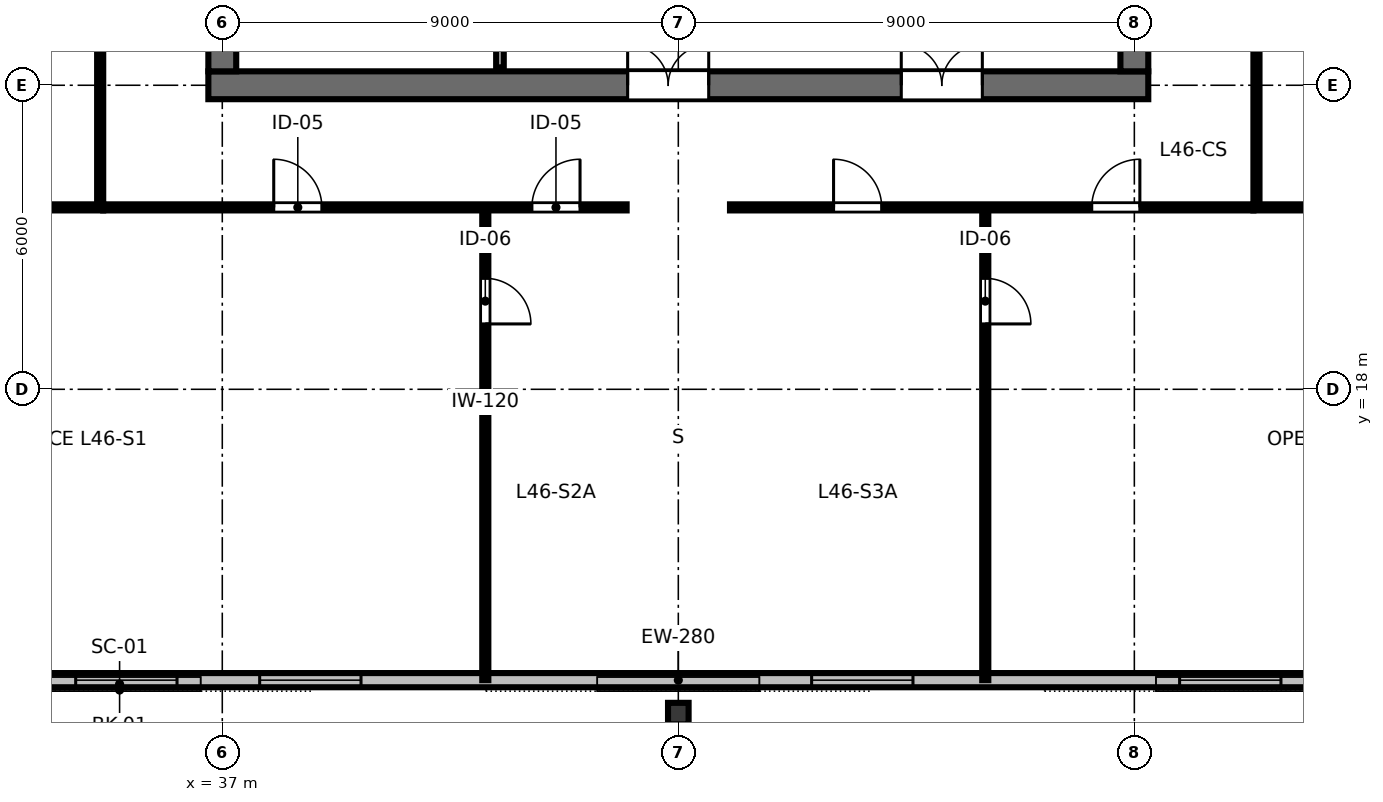
"""IFC4 building model, lengths in metres.
Left out: names, types, materials, properties, quantities, classifications, styles, units other than length and angle.
Written with IfcOpenShell. Run it as: python <this file> out.ifc"""

import sys

from ifc_helpers import new_model, si_unit, direction, frame, frame_2d, origin, origin_2d, place, context, subcontext, project, spatial, rectangle, i_section, extrude, element, fill, save


model = new_model("IFC4")
c1 = context("Model", 3, precision=1e-05, world=origin(), true_north=direction((0.0, 1.0)))
c2 = subcontext(c1, "Body", "Model", "MODEL_VIEW")
j1 = project(units=[si_unit("LENGTHUNIT", "METRE"), si_unit("PLANEANGLEUNIT", "RADIAN")], contexts=[c1])
p1 = place(None, origin())
s1 = spatial("IfcSite", under=j1, at=p1, CompositionType="ELEMENT")
p2 = place(p1, origin())
s2 = spatial("IfcBuilding", under=s1, at=p2, CompositionType="ELEMENT")
p3 = place(p2, frame((0.0, 0.0, 177.0)))
s3 = spatial("IfcBuildingStorey", under=s2, at=p3, CompositionType="ELEMENT", Elevation=177.0)
p4 = place(p3, frame((36.725, 24.0, 0.0), z_axis=(0.0, 0.0, 1.0), x_axis=(1.0, 0.0, 0.0)))
e1 = element("IfcWall", 1, at=p4, inside=s3, PredefinedType="SHEAR", context=c2, shape_type="SweptSolid", body=[
    extrude(rectangle(XDim=18.55, YDim=0.55, at=frame_2d((9.275, 0.0))), origin(), (0.0, 0.0, 1.0), 3.36),
])
p5 = place(p4, frame((8.275, 0.0, 0.0)))
e2 = element("IfcOpeningElement", 2, at=p5, cuts=e1, PredefinedType="OPENING", context=c2, shape_type="SweptSolid", body=[
    extrude(rectangle(XDim=1.6, YDim=2.15, at=frame_2d((0.8, 1.075))), frame((0.0, 0.285, 0.0), z_axis=(0.0, -1.0, 0.0), x_axis=(1.0, 0.0, 0.0)), (0.0, 0.0, 1.0), 0.57),
])
p6 = place(p4, frame((13.675, 0.0, 0.0)))
e3 = element("IfcOpeningElement", 3, at=p6, cuts=e1, PredefinedType="OPENING", context=c2, shape_type="SweptSolid", body=[
    extrude(rectangle(XDim=1.6, YDim=2.15, at=frame_2d((0.8, 1.075))), frame((0.0, 0.285, 0.0), z_axis=(0.0, -1.0, 0.0), x_axis=(1.0, 0.0, 0.0)), (0.0, 0.0, 1.0), 0.57),
])
p7 = place(p3, frame((37.0, 24.275, 0.0), z_axis=(0.0, 0.0, 1.0), x_axis=(0.0, 1.0, 0.0)))
e4 = element("IfcWall", 4, at=p7, inside=s3, PredefinedType="SHEAR", context=c2, shape_type="SweptSolid", body=[
    extrude(rectangle(XDim=15.45, YDim=0.55, at=frame_2d((7.725, 0.0))), origin(), (0.0, 0.0, 1.0), 3.36),
])
p8 = place(p7, frame((5.25, 0.0, 0.0)))
e5 = element("IfcOpeningElement", 5, at=p8, cuts=e4, PredefinedType="OPENING", context=c2, shape_type="SweptSolid", body=[
    extrude(rectangle(XDim=1.15, YDim=2.15, at=frame_2d((0.575, 1.075))), frame((0.0, 0.285, 0.0), z_axis=(0.0, -1.0, 0.0), x_axis=(1.0, 0.0, 0.0)), (0.0, 0.0, 1.0), 0.57),
])
p9 = place(p3, frame((55.0, 24.275, 0.0), z_axis=(0.0, 0.0, 1.0), x_axis=(0.0, 1.0, 0.0)))
e6 = element("IfcWall", 6, at=p9, inside=s3, PredefinedType="SHEAR", context=c2, shape_type="SweptSolid", body=[
    extrude(rectangle(XDim=15.45, YDim=0.55, at=frame_2d((7.725, 0.0))), origin(), (0.0, 0.0, 1.0), 3.36),
])
p10 = place(p9, frame((5.25, 0.0, 0.0)))
e7 = element("IfcOpeningElement", 7, at=p10, cuts=e6, PredefinedType="OPENING", context=c2, shape_type="SweptSolid", body=[
    extrude(rectangle(XDim=1.15, YDim=2.15, at=frame_2d((0.575, 1.075))), frame((0.0, 0.285, 0.0), z_axis=(0.0, -1.0, 0.0), x_axis=(1.0, 0.0, 0.0)), (0.0, 0.0, 1.0), 0.57),
])
p11 = place(p3, frame((46.0, 11.6, 0.0), z_axis=(0.0, 0.0, 1.0), x_axis=(1.0, 0.0, 0.0)))
e8 = element("IfcColumn", 8, at=p11, inside=s3, PredefinedType="COLUMN", context=c2, shape_type="SweptSolid", body=[
    extrude(i_section(OverallWidth=0.406, OverallDepth=0.425, WebThickness=0.033, FlangeThickness=0.052, FilletRadius=0.025, at=origin_2d()), origin(), (0.0, 0.0, 1.0), 3.358),
])
p12 = place(p3, frame((28.56, 12.26, 0.0), z_axis=(0.0, 0.0, 1.0), x_axis=(1.0, 0.0, 0.0)))
e9 = element("IfcWall", 9, at=p12, inside=s3, PredefinedType="STANDARD", context=c2, shape_type="SweptSolid", body=[
    extrude(rectangle(XDim=34.88, YDim=0.28, at=frame_2d((17.44, 0.0))), origin(), (0.0, 0.0, 1.0), 3.36),
])
p13 = place(p12, frame((1.916, 0.0, 0.8)))
e10 = element("IfcOpeningElement", 10, at=p13, cuts=e9, PredefinedType="OPENING", context=c2, shape_type="SweptSolid", body=[
    extrude(rectangle(XDim=2.0, YDim=1.95, at=frame_2d((1.0, 0.975))), frame((0.0, 0.15, 0.0), z_axis=(0.0, -1.0, 0.0), x_axis=(1.0, 0.0, 0.0)), (0.0, 0.0, 1.0), 0.3),
])
p14 = place(p12, frame((5.547, 0.0, 0.8)))
e11 = element("IfcOpeningElement", 11, at=p14, cuts=e9, PredefinedType="OPENING", context=c2, shape_type="SweptSolid", body=[
    extrude(rectangle(XDim=2.0, YDim=1.95, at=frame_2d((1.0, 0.975))), frame((0.0, 0.15, 0.0), z_axis=(0.0, -1.0, 0.0), x_axis=(1.0, 0.0, 0.0)), (0.0, 0.0, 1.0), 0.3),
])
p15 = place(p12, frame((9.178, 0.0, 0.8)))
e12 = element("IfcOpeningElement", 12, at=p15, cuts=e9, PredefinedType="OPENING", context=c2, shape_type="SweptSolid", body=[
    extrude(rectangle(XDim=2.0, YDim=1.95, at=frame_2d((1.0, 0.975))), frame((0.0, 0.15, 0.0), z_axis=(0.0, -1.0, 0.0), x_axis=(1.0, 0.0, 0.0)), (0.0, 0.0, 1.0), 0.3),
])
p16 = place(p12, frame((20.071, 0.0, 0.8)))
e13 = element("IfcOpeningElement", 13, at=p16, cuts=e9, PredefinedType="OPENING", context=c2, shape_type="SweptSolid", body=[
    extrude(rectangle(XDim=2.0, YDim=1.95, at=frame_2d((1.0, 0.975))), frame((0.0, 0.15, 0.0), z_axis=(0.0, -1.0, 0.0), x_axis=(1.0, 0.0, 0.0)), (0.0, 0.0, 1.0), 0.3),
])
p17 = place(p12, frame((27.333, 0.0, 0.8)))
e14 = element("IfcOpeningElement", 14, at=p17, cuts=e9, PredefinedType="OPENING", context=c2, shape_type="SweptSolid", body=[
    extrude(rectangle(XDim=2.0, YDim=1.95, at=frame_2d((1.0, 0.975))), frame((0.0, 0.15, 0.0), z_axis=(0.0, -1.0, 0.0), x_axis=(1.0, 0.0, 0.0)), (0.0, 0.0, 1.0), 0.3),
])
p18 = place(p12, frame((30.964, 0.0, 0.8)))
e15 = element("IfcOpeningElement", 15, at=p18, cuts=e9, PredefinedType="OPENING", context=c2, shape_type="SweptSolid", body=[
    extrude(rectangle(XDim=2.0, YDim=1.95, at=frame_2d((1.0, 0.975))), frame((0.0, 0.15, 0.0), z_axis=(0.0, -1.0, 0.0), x_axis=(1.0, 0.0, 0.0)), (0.0, 0.0, 1.0), 0.3),
])
p19 = place(p3, frame((42.48, 24.35, 0.0), z_axis=(0.0, 0.0, 1.0), x_axis=(0.0, 1.0, 0.0)))
e16 = element("IfcWall", 16, at=p19, inside=s3, PredefinedType="PARTITIONING", context=c2, shape_type="SweptSolid", body=[
    extrude(rectangle(XDim=3.9, YDim=0.15, at=frame_2d((1.95, 0.0))), origin(), (0.0, 0.0, 1.0), 3.36),
])
p20 = place(p19, frame((0.35, 0.0, 0.0)))
e17 = element("IfcOpeningElement", 17, at=p20, cuts=e16, PredefinedType="OPENING", context=c2, shape_type="SweptSolid", body=[
    extrude(rectangle(XDim=0.9, YDim=2.15, at=frame_2d((0.45, 1.075))), frame((0.0, 0.085, 0.0), z_axis=(0.0, -1.0, 0.0), x_axis=(1.0, 0.0, 0.0)), (0.0, 0.0, 1.0), 0.17),
])
p21 = place(p3, frame((42.191, 21.59, 0.0), z_axis=(0.0, 0.0, 1.0), x_axis=(0.0, -1.0, 0.0)))
e18 = element("IfcWall", 18, at=p21, inside=s3, PredefinedType="PARTITIONING", context=c2, shape_type="SweptSolid", body=[
    extrude(rectangle(XDim=9.33, YDim=0.12, at=frame_2d((4.665, 0.0))), origin(), (0.0, 0.0, 1.0), 2.64),
])
p22 = place(p21, frame((1.4, 0.0, 0.0)))
e19 = element("IfcOpeningElement", 19, at=p22, cuts=e18, PredefinedType="OPENING", context=c2, shape_type="SweptSolid", body=[
    extrude(rectangle(XDim=0.9, YDim=2.15, at=frame_2d((0.45, 1.075))), frame((0.0, 0.07, 0.0), z_axis=(0.0, -1.0, 0.0), x_axis=(1.0, 0.0, 0.0)), (0.0, 0.0, 1.0), 0.14),
])
p23 = place(p3, frame((52.058, 21.59, 0.0), z_axis=(0.0, 0.0, 1.0), x_axis=(0.0, -1.0, 0.0)))
e20 = element("IfcWall", 20, at=p23, inside=s3, PredefinedType="PARTITIONING", context=c2, shape_type="SweptSolid", body=[
    extrude(rectangle(XDim=9.33, YDim=0.12, at=frame_2d((4.665, 0.0))), origin(), (0.0, 0.0, 1.0), 2.64),
])
p24 = place(p23, frame((1.4, 0.0, 0.0)))
e21 = element("IfcOpeningElement", 21, at=p24, cuts=e20, PredefinedType="OPENING", context=c2, shape_type="SweptSolid", body=[
    extrude(rectangle(XDim=0.9, YDim=2.15, at=frame_2d((0.45, 1.075))), frame((0.0, 0.07, 0.0), z_axis=(0.0, -1.0, 0.0), x_axis=(1.0, 0.0, 0.0)), (0.0, 0.0, 1.0), 0.14),
])
p25 = place(p3, frame((34.65, 21.59, 0.0), z_axis=(0.0, 0.0, 1.0), x_axis=(1.0, 0.0, 0.0)))
e22 = element("IfcWall", 22, at=p25, inside=s3, PredefinedType="PARTITIONING", context=c2, shape_type="SweptSolid", body=[
    extrude(rectangle(XDim=10.33, YDim=0.12, at=frame_2d((5.165, 0.0))), origin(), (0.0, 0.0, 1.0), 2.64),
])
p26 = place(p25, frame((3.365, 0.0, 0.0)))
e23 = element("IfcOpeningElement", 23, at=p26, cuts=e22, PredefinedType="OPENING", context=c2, shape_type="SweptSolid", body=[
    extrude(rectangle(XDim=0.95, YDim=2.15, at=frame_2d((0.475, 1.075))), frame((0.0, 0.07, 0.0), z_axis=(0.0, -1.0, 0.0), x_axis=(1.0, 0.0, 0.0)), (0.0, 0.0, 1.0), 0.14),
])
p27 = place(p25, frame((8.46, 0.0, 0.0)))
e24 = element("IfcOpeningElement", 24, at=p27, cuts=e22, PredefinedType="OPENING", context=c2, shape_type="SweptSolid", body=[
    extrude(rectangle(XDim=0.95, YDim=2.15, at=frame_2d((0.475, 1.075))), frame((0.0, 0.07, 0.0), z_axis=(0.0, -1.0, 0.0), x_axis=(1.0, 0.0, 0.0)), (0.0, 0.0, 1.0), 0.14),
])
p28 = place(p3, frame((47.02, 21.59, 0.0), z_axis=(0.0, 0.0, 1.0), x_axis=(1.0, 0.0, 0.0)))
e25 = element("IfcWall", 25, at=p28, inside=s3, PredefinedType="PARTITIONING", context=c2, shape_type="SweptSolid", body=[
    extrude(rectangle(XDim=10.33, YDim=0.12, at=frame_2d((5.165, 0.0))), origin(), (0.0, 0.0, 1.0), 2.64),
])
p29 = place(p28, frame((2.044, 0.0, 0.0)))
e26 = element("IfcOpeningElement", 26, at=p29, cuts=e25, PredefinedType="OPENING", context=c2, shape_type="SweptSolid", body=[
    extrude(rectangle(XDim=0.95, YDim=2.15, at=frame_2d((0.475, 1.075))), frame((0.0, 0.07, 0.0), z_axis=(0.0, -1.0, 0.0), x_axis=(1.0, 0.0, 0.0)), (0.0, 0.0, 1.0), 0.14),
])
p30 = place(p28, frame((7.139, 0.0, 0.0)))
e27 = element("IfcOpeningElement", 27, at=p30, cuts=e25, PredefinedType="OPENING", context=c2, shape_type="SweptSolid", body=[
    extrude(rectangle(XDim=0.95, YDim=2.15, at=frame_2d((0.475, 1.075))), frame((0.0, 0.07, 0.0), z_axis=(0.0, -1.0, 0.0), x_axis=(1.0, 0.0, 0.0)), (0.0, 0.0, 1.0), 0.14),
])
p31 = place(p3, frame((34.59, 21.65, 0.0), z_axis=(0.0, 0.0, 1.0), x_axis=(0.0, 1.0, 0.0)))
e28 = element("IfcWall", 28, at=p31, inside=s3, PredefinedType="PARTITIONING", context=c2, shape_type="SweptSolid", body=[
    extrude(rectangle(XDim=20.7, YDim=0.12, at=frame_2d((10.35, 0.0))), origin(), (0.0, 0.0, 1.0), 2.64),
])
p32 = place(p31, frame((9.875, 0.0, 0.0)))
e29 = element("IfcOpeningElement", 29, at=p32, cuts=e28, PredefinedType="OPENING", context=c2, shape_type="SweptSolid", body=[
    extrude(rectangle(XDim=0.95, YDim=2.15, at=frame_2d((0.475, 1.075))), frame((0.0, 0.07, 0.0), z_axis=(0.0, -1.0, 0.0), x_axis=(1.0, 0.0, 0.0)), (0.0, 0.0, 1.0), 0.14),
])
p33 = place(p3, frame((57.41, 21.65, 0.0), z_axis=(0.0, 0.0, 1.0), x_axis=(0.0, 1.0, 0.0)))
e30 = element("IfcWall", 30, at=p33, inside=s3, PredefinedType="PARTITIONING", context=c2, shape_type="SweptSolid", body=[
    extrude(rectangle(XDim=20.7, YDim=0.12, at=frame_2d((10.35, 0.0))), origin(), (0.0, 0.0, 1.0), 2.64),
])
p34 = place(p33, frame((6.073, 0.0, 0.0)))
e31 = element("IfcOpeningElement", 31, at=p34, cuts=e30, PredefinedType="OPENING", context=c2, shape_type="SweptSolid", body=[
    extrude(rectangle(XDim=0.95, YDim=2.15, at=frame_2d((0.475, 1.075))), frame((0.0, 0.07, 0.0), z_axis=(0.0, -1.0, 0.0), x_axis=(1.0, 0.0, 0.0)), (0.0, 0.0, 1.0), 0.14),
])
p35 = place(p33, frame((16.223, 0.0, 0.0)))
e32 = element("IfcOpeningElement", 32, at=p35, cuts=e30, PredefinedType="OPENING", context=c2, shape_type="SweptSolid", body=[
    extrude(rectangle(XDim=0.95, YDim=2.15, at=frame_2d((0.475, 1.075))), frame((0.0, 0.07, 0.0), z_axis=(0.0, -1.0, 0.0), x_axis=(1.0, 0.0, 0.0)), (0.0, 0.0, 1.0), 0.14),
])
for number, where, z_axis, x_axis in (
    (33, (34.65, 21.59, 0.0), (0.0, 0.0, 1.0), (-1.0, 0.0, 0.0)),
    (34, (57.35, 21.59, 0.0), (0.0, 0.0, 1.0), (1.0, 0.0, 0.0)),
):
    element("IfcWall", number, at=place(p3, frame(where, z_axis=z_axis, x_axis=x_axis)), inside=s3, PredefinedType="PARTITIONING", context=c2, shape_type="SweptSolid", body=[
        extrude(rectangle(XDim=11.03, YDim=0.12, at=frame_2d((5.515, 0.0))), origin(), (0.0, 0.0, 1.0), 2.64),
    ])
p36 = place(p14, origin())
e35 = element("IfcWindow", 35, at=p36, inside=s3, PartitioningType="SINGLE_PANEL", PredefinedType="WINDOW", context=c2, shape_type="SweptSolid", body=[
    extrude(rectangle(XDim=2.0, YDim=1.95, at=frame_2d((1.0, 0.975))), frame((0.0, 0.03, 0.0), z_axis=(0.0, -1.0, 0.0), x_axis=(1.0, 0.0, 0.0)), (0.0, 0.0, 1.0), 0.06),
])
fill(e11, e35)
p37 = place(p15, origin())
e36 = element("IfcWindow", 36, at=p37, inside=s3, PartitioningType="SINGLE_PANEL", PredefinedType="WINDOW", context=c2, shape_type="SweptSolid", body=[
    extrude(rectangle(XDim=2.0, YDim=1.95, at=frame_2d((1.0, 0.975))), frame((0.0, 0.03, 0.0), z_axis=(0.0, -1.0, 0.0), x_axis=(1.0, 0.0, 0.0)), (0.0, 0.0, 1.0), 0.06),
])
fill(e12, e36)
p38 = place(p16, origin())
e37 = element("IfcWindow", 37, at=p38, inside=s3, PartitioningType="SINGLE_PANEL", PredefinedType="WINDOW", context=c2, shape_type="SweptSolid", body=[
    extrude(rectangle(XDim=2.0, YDim=1.95, at=frame_2d((1.0, 0.975))), frame((0.0, 0.03, 0.0), z_axis=(0.0, -1.0, 0.0), x_axis=(1.0, 0.0, 0.0)), (0.0, 0.0, 1.0), 0.06),
])
fill(e13, e37)
p39 = place(p17, origin())
e38 = element("IfcWindow", 38, at=p39, inside=s3, PartitioningType="SINGLE_PANEL", PredefinedType="WINDOW", context=c2, shape_type="SweptSolid", body=[
    extrude(rectangle(XDim=2.0, YDim=1.95, at=frame_2d((1.0, 0.975))), frame((0.0, 0.03, 0.0), z_axis=(0.0, -1.0, 0.0), x_axis=(1.0, 0.0, 0.0)), (0.0, 0.0, 1.0), 0.06),
])
fill(e14, e38)
p40 = place(p5, origin())
e39 = element("IfcDoor", 39, at=p40, inside=s3, OperationType="DOUBLE_DOOR_SINGLE_SWING", PredefinedType="DOOR", context=c2, shape_type="SweptSolid", body=[
    extrude(rectangle(XDim=1.6, YDim=2.15, at=frame_2d((0.8, 1.075))), frame((0.0, 0.025, 0.0), z_axis=(0.0, -1.0, 0.0), x_axis=(1.0, 0.0, 0.0)), (0.0, 0.0, 1.0), 0.05),
])
fill(e2, e39)
p41 = place(p6, origin())
e40 = element("IfcDoor", 40, at=p41, inside=s3, OperationType="DOUBLE_DOOR_SINGLE_SWING", PredefinedType="DOOR", context=c2, shape_type="SweptSolid", body=[
    extrude(rectangle(XDim=1.6, YDim=2.15, at=frame_2d((0.8, 1.075))), frame((0.0, 0.025, 0.0), z_axis=(0.0, -1.0, 0.0), x_axis=(1.0, 0.0, 0.0)), (0.0, 0.0, 1.0), 0.05),
])
fill(e3, e40)
p42 = place(p22, origin())
e41 = element("IfcDoor", 41, at=p42, inside=s3, OperationType="SINGLE_SWING_RIGHT", PredefinedType="DOOR", context=c2, shape_type="SweptSolid", body=[
    extrude(rectangle(XDim=0.9, YDim=2.15, at=frame_2d((0.45, 1.075))), frame((0.0, 0.025, 0.0), z_axis=(0.0, -1.0, 0.0), x_axis=(1.0, 0.0, 0.0)), (0.0, 0.0, 1.0), 0.05),
])
fill(e19, e41)
p43 = place(p24, origin())
e42 = element("IfcDoor", 42, at=p43, inside=s3, OperationType="SINGLE_SWING_RIGHT", PredefinedType="DOOR", context=c2, shape_type="SweptSolid", body=[
    extrude(rectangle(XDim=0.9, YDim=2.15, at=frame_2d((0.45, 1.075))), frame((0.0, 0.025, 0.0), z_axis=(0.0, -1.0, 0.0), x_axis=(1.0, 0.0, 0.0)), (0.0, 0.0, 1.0), 0.05),
])
fill(e21, e42)
p44 = place(p26, origin())
e43 = element("IfcDoor", 43, at=p44, inside=s3, OperationType="SINGLE_SWING_LEFT", PredefinedType="DOOR", context=c2, shape_type="SweptSolid", body=[
    extrude(rectangle(XDim=0.95, YDim=2.15, at=frame_2d((0.475, 1.075))), frame((0.0, 0.025, 0.0), z_axis=(0.0, -1.0, 0.0), x_axis=(1.0, 0.0, 0.0)), (0.0, 0.0, 1.0), 0.05),
])
fill(e23, e43)
p45 = place(p27, origin())
e44 = element("IfcDoor", 44, at=p45, inside=s3, OperationType="SINGLE_SWING_RIGHT", PredefinedType="DOOR", context=c2, shape_type="SweptSolid", body=[
    extrude(rectangle(XDim=0.95, YDim=2.15, at=frame_2d((0.475, 1.075))), frame((0.0, 0.025, 0.0), z_axis=(0.0, -1.0, 0.0), x_axis=(1.0, 0.0, 0.0)), (0.0, 0.0, 1.0), 0.05),
])
fill(e24, e44)
p46 = place(p29, origin())
e45 = element("IfcDoor", 45, at=p46, inside=s3, OperationType="SINGLE_SWING_LEFT", PredefinedType="DOOR", context=c2, shape_type="SweptSolid", body=[
    extrude(rectangle(XDim=0.95, YDim=2.15, at=frame_2d((0.475, 1.075))), frame((0.0, 0.025, 0.0), z_axis=(0.0, -1.0, 0.0), x_axis=(1.0, 0.0, 0.0)), (0.0, 0.0, 1.0), 0.05),
])
fill(e26, e45)
p47 = place(p30, origin())
e46 = element("IfcDoor", 46, at=p47, inside=s3, OperationType="SINGLE_SWING_RIGHT", PredefinedType="DOOR", context=c2, shape_type="SweptSolid", body=[
    extrude(rectangle(XDim=0.95, YDim=2.15, at=frame_2d((0.475, 1.075))), frame((0.0, 0.025, 0.0), z_axis=(0.0, -1.0, 0.0), x_axis=(1.0, 0.0, 0.0)), (0.0, 0.0, 1.0), 0.05),
])
fill(e27, e46)
save(model, sys.argv[1])
